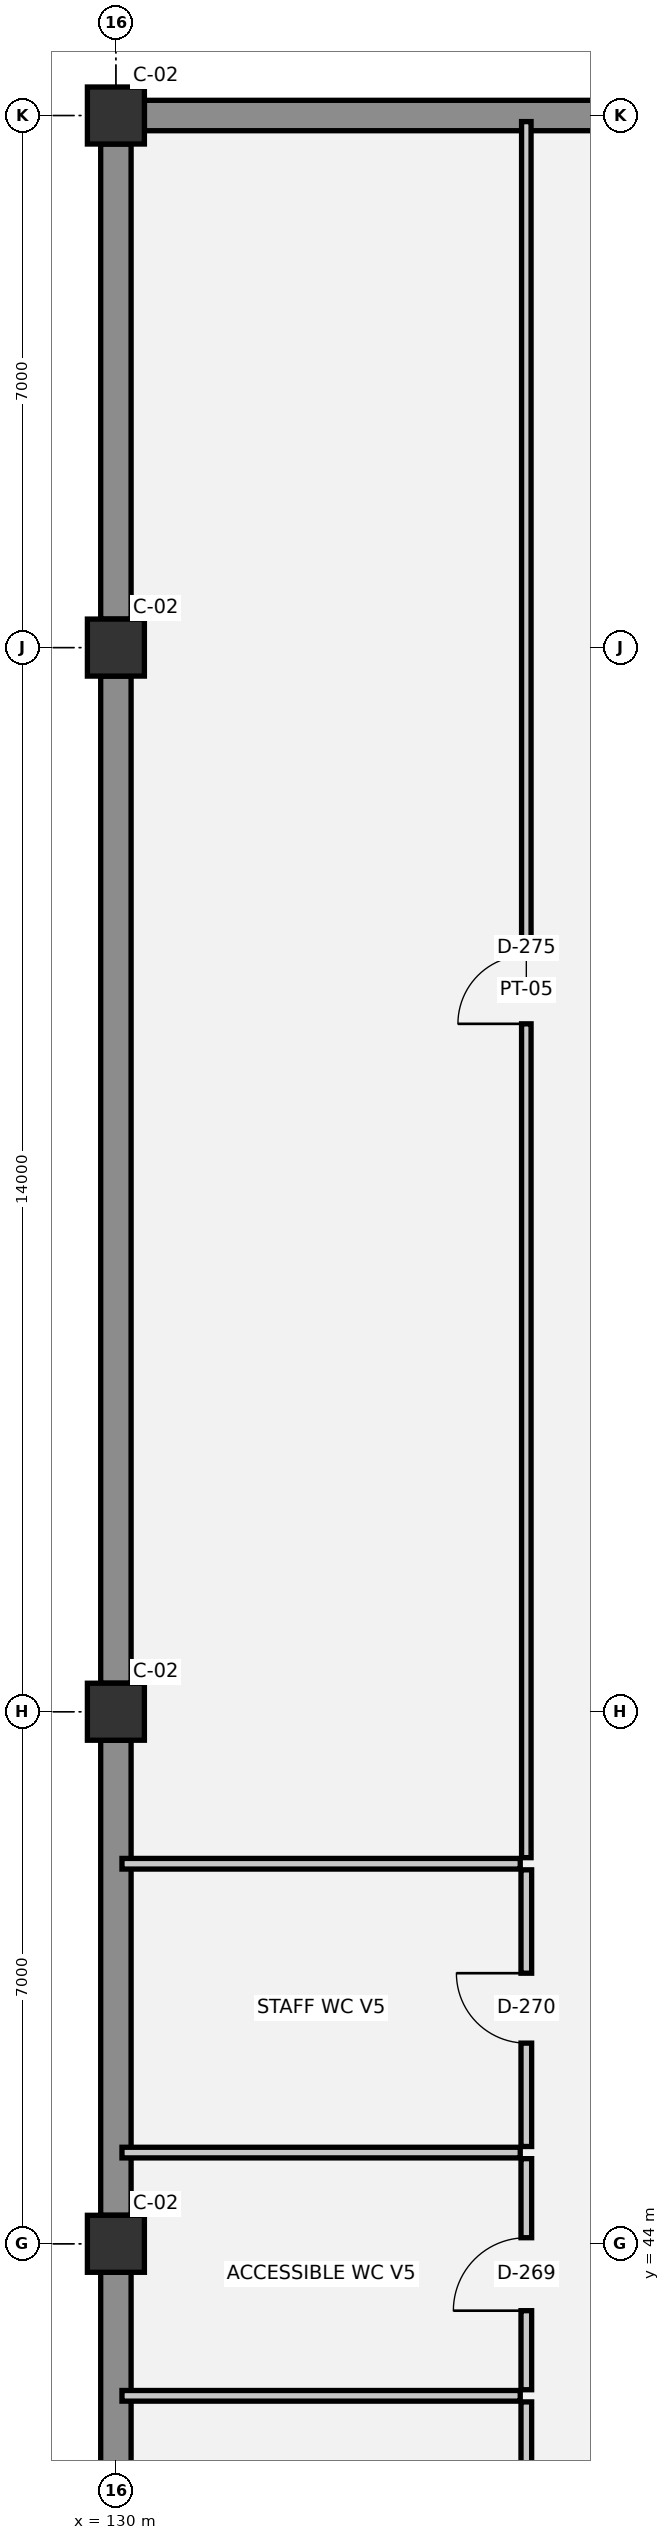
"""IFC4 building model, lengths in metres.
Left out: names, types, materials, properties, quantities, classifications, styles, units other than length and angle.
Written with IfcOpenShell. Run it as: python <this file> out.ifc"""

import sys

from ifc_helpers import new_model, si_unit, direction, frame, frame_2d, origin, origin_2d, place, context, subcontext, project, spatial, rectangle, extrude, element, fill, save


model = new_model("IFC4")
c1 = context("Model", 3, precision=1e-05, world=origin(), true_north=direction((0.0, 1.0)))
c2 = subcontext(c1, "Body", "Model", "MODEL_VIEW")
j1 = project(units=[si_unit("LENGTHUNIT", "METRE"), si_unit("PLANEANGLEUNIT", "RADIAN")], contexts=[c1])
p1 = place(None, origin())
s1 = spatial("IfcSite", under=j1, at=p1, CompositionType="ELEMENT")
p2 = place(p1, origin())
s2 = spatial("IfcBuilding", under=s1, at=p2, CompositionType="ELEMENT")
p3 = place(p2, frame((0.0, 0.0, -4.5)))
s3 = spatial("IfcBuildingStorey", under=s2, at=p3, CompositionType="ELEMENT", Elevation=-4.5)
for number, where, z_axis, x_axis in (
    (1, (130.0, 44.0, 0.0), (0.0, 0.0, 1.0), (1.0, 0.0, 0.0)),
    (2, (130.0, 51.0, 0.0), (0.0, 0.0, 1.0), (1.0, 0.0, 0.0)),
    (3, (130.0, 65.0, 0.0), (0.0, 0.0, 1.0), (1.0, 0.0, 0.0)),
    (4, (130.0, 72.0, 0.0), (0.0, 0.0, 1.0), (1.0, 0.0, 0.0)),
):
    element("IfcColumn", number, at=place(p3, frame(where, z_axis=z_axis, x_axis=x_axis)), inside=s3, PredefinedType="COLUMN", context=c2, shape_type="SweptSolid", body=[
        extrude(rectangle(XDim=0.75, YDim=0.75, at=origin_2d()), origin(), (0.0, 0.0, 1.0), 4.5),
    ])
p4 = place(p3, frame((130.0, 38.375, 0.0), z_axis=(0.0, 0.0, 1.0), x_axis=(0.0, 1.0, 0.0)))
e5 = element("IfcWall", 5, at=p4, inside=s3, PredefinedType="STANDARD", context=c2, shape_type="SweptSolid", body=[
    extrude(rectangle(XDim=5.25, YDim=0.4, at=frame_2d((2.625, 0.0))), origin(), (0.0, 0.0, 1.0), 4.2),
])
p5 = place(p3, frame((130.0, 44.375, 0.0), z_axis=(0.0, 0.0, 1.0), x_axis=(0.0, 1.0, 0.0)))
e6 = element("IfcWall", 6, at=p5, inside=s3, PredefinedType="STANDARD", context=c2, shape_type="SweptSolid", body=[
    extrude(rectangle(XDim=6.25, YDim=0.4, at=frame_2d((3.125, 0.0))), origin(), (0.0, 0.0, 1.0), 4.2),
])
p6 = place(p3, frame((130.0, 51.375, 0.0), z_axis=(0.0, 0.0, 1.0), x_axis=(0.0, 1.0, 0.0)))
e7 = element("IfcWall", 7, at=p6, inside=s3, PredefinedType="STANDARD", context=c2, shape_type="SweptSolid", body=[
    extrude(rectangle(XDim=13.25, YDim=0.4, at=frame_2d((6.625, 0.0))), origin(), (0.0, 0.0, 1.0), 4.2),
])
p7 = place(p3, frame((130.0, 65.375, 0.0), z_axis=(0.0, 0.0, 1.0), x_axis=(0.0, 1.0, 0.0)))
e8 = element("IfcWall", 8, at=p7, inside=s3, PredefinedType="STANDARD", context=c2, shape_type="SweptSolid", body=[
    extrude(rectangle(XDim=6.25, YDim=0.4, at=frame_2d((3.125, 0.0))), origin(), (0.0, 0.0, 1.0), 4.2),
])
p8 = place(p3, frame((130.375, 72.0, 0.0), z_axis=(0.0, 0.0, 1.0), x_axis=(1.0, 0.0, 0.0)))
e9 = element("IfcWall", 9, at=p8, inside=s3, PredefinedType="STANDARD", context=c2, shape_type="SweptSolid", body=[
    extrude(rectangle(XDim=7.25, YDim=0.4, at=frame_2d((3.625, 0.0))), origin(), (0.0, 0.0, 1.0), 4.2),
])
for number, where, z_axis, x_axis in (
    (10, (130.08, 42.0, 0.0), (0.0, 0.0, 1.0), (1.0, 0.0, 0.0)),
    (11, (130.08, 45.2, 0.0), (0.0, 0.0, 1.0), (1.0, 0.0, 0.0)),
    (12, (130.08, 49.0, 0.0), (0.0, 0.0, 1.0), (1.0, 0.0, 0.0)),
):
    element("IfcWall", number, at=place(p3, frame(where, z_axis=z_axis, x_axis=x_axis)), inside=s3, PredefinedType="PLUMBINGWALL", context=c2, shape_type="SweptSolid", body=[
        extrude(rectangle(XDim=5.24, YDim=0.14, at=frame_2d((2.62, 0.0))), origin(), (0.0, 0.0, 1.0), 4.14),
    ])
p9 = place(p3, frame((135.4, 38.08, 0.0), z_axis=(0.0, 0.0, 1.0), x_axis=(0.0, 1.0, 0.0)))
e13 = element("IfcWall", 13, at=p9, inside=s3, PredefinedType="PLUMBINGWALL", context=c2, shape_type="SweptSolid", body=[
    extrude(rectangle(XDim=3.84, YDim=0.14, at=frame_2d((1.92, 0.0))), origin(), (0.0, 0.0, 1.0), 4.14),
])
p10 = place(p9, frame((1.46, 0.0, 0.0)))
e14 = element("IfcOpeningElement", 14, at=p10, cuts=e13, PredefinedType="OPENING", context=c2, shape_type="SweptSolid", body=[
    extrude(rectangle(XDim=0.92, YDim=2.1, at=frame_2d((0.46, 1.05))), frame((0.0, 0.08, 0.0), z_axis=(0.0, -1.0, 0.0), x_axis=(1.0, 0.0, 0.0)), (0.0, 0.0, 1.0), 0.16),
])
p11 = place(p3, frame((135.4, 42.08, 0.0), z_axis=(0.0, 0.0, 1.0), x_axis=(0.0, 1.0, 0.0)))
e15 = element("IfcWall", 15, at=p11, inside=s3, PredefinedType="PLUMBINGWALL", context=c2, shape_type="SweptSolid", body=[
    extrude(rectangle(XDim=3.04, YDim=0.14, at=frame_2d((1.52, 0.0))), origin(), (0.0, 0.0, 1.0), 4.14),
])
p12 = place(p11, frame((1.04, 0.0, 0.0)))
e16 = element("IfcOpeningElement", 16, at=p12, cuts=e15, PredefinedType="OPENING", context=c2, shape_type="SweptSolid", body=[
    extrude(rectangle(XDim=0.96, YDim=2.1, at=frame_2d((0.48, 1.05))), frame((0.0, 0.08, 0.0), z_axis=(0.0, -1.0, 0.0), x_axis=(1.0, 0.0, 0.0)), (0.0, 0.0, 1.0), 0.16),
])
p13 = place(p3, frame((135.4, 45.28, 0.0), z_axis=(0.0, 0.0, 1.0), x_axis=(0.0, 1.0, 0.0)))
e17 = element("IfcWall", 17, at=p13, inside=s3, PredefinedType="PLUMBINGWALL", context=c2, shape_type="SweptSolid", body=[
    extrude(rectangle(XDim=3.64, YDim=0.14, at=frame_2d((1.82, 0.0))), origin(), (0.0, 0.0, 1.0), 4.14),
])
p14 = place(p13, frame((1.36, 0.0, 0.0)))
e18 = element("IfcOpeningElement", 18, at=p14, cuts=e17, PredefinedType="OPENING", context=c2, shape_type="SweptSolid", body=[
    extrude(rectangle(XDim=0.92, YDim=2.1, at=frame_2d((0.46, 1.05))), frame((0.0, 0.08, 0.0), z_axis=(0.0, -1.0, 0.0), x_axis=(1.0, 0.0, 0.0)), (0.0, 0.0, 1.0), 0.16),
])
p15 = place(p3, frame((135.4, 49.08, 0.0), z_axis=(0.0, 0.0, 1.0), x_axis=(0.0, 1.0, 0.0)))
e19 = element("IfcWall", 19, at=p15, inside=s3, PredefinedType="PARTITIONING", context=c2, shape_type="SweptSolid", body=[
    extrude(rectangle(XDim=22.84, YDim=0.125, at=frame_2d((11.42, 0.0))), origin(), (0.0, 0.0, 1.0), 4.14),
])
p16 = place(p15, frame((10.97, 0.0, 0.0)))
e20 = element("IfcOpeningElement", 20, at=p16, cuts=e19, PredefinedType="OPENING", context=c2, shape_type="SweptSolid", body=[
    extrude(rectangle(XDim=0.9, YDim=2.15, at=frame_2d((0.45, 1.075))), frame((0.0, 0.073, 0.0), z_axis=(0.0, -1.0, 0.0), x_axis=(1.0, 0.0, 0.0)), (0.0, 0.0, 1.0), 0.145),
])
p17 = place(p12, origin())
e21 = element("IfcDoor", 21, at=p17, inside=s3, OperationType="SINGLE_SWING_LEFT", PredefinedType="DOOR", context=c2, shape_type="SweptSolid", body=[
    extrude(rectangle(XDim=0.96, YDim=2.1, at=frame_2d((0.48, 1.05))), frame((0.0, 0.025, 0.0), z_axis=(0.0, -1.0, 0.0), x_axis=(1.0, 0.0, 0.0)), (0.0, 0.0, 1.0), 0.05),
])
fill(e16, e21)
p18 = place(p14, origin())
e22 = element("IfcDoor", 22, at=p18, inside=s3, OperationType="SINGLE_SWING_RIGHT", PredefinedType="DOOR", context=c2, shape_type="SweptSolid", body=[
    extrude(rectangle(XDim=0.92, YDim=2.1, at=frame_2d((0.46, 1.05))), frame((0.0, 0.025, 0.0), z_axis=(0.0, -1.0, 0.0), x_axis=(1.0, 0.0, 0.0)), (0.0, 0.0, 1.0), 0.05),
])
fill(e18, e22)
p19 = place(p16, origin())
e23 = element("IfcDoor", 23, at=p19, inside=s3, OperationType="SINGLE_SWING_LEFT", PredefinedType="DOOR", context=c2, shape_type="SweptSolid", body=[
    extrude(rectangle(XDim=0.9, YDim=2.15, at=frame_2d((0.45, 1.075))), frame((0.0, 0.025, 0.0), z_axis=(0.0, -1.0, 0.0), x_axis=(1.0, 0.0, 0.0)), (0.0, 0.0, 1.0), 0.05),
])
fill(e20, e23)
save(model, sys.argv[1])
